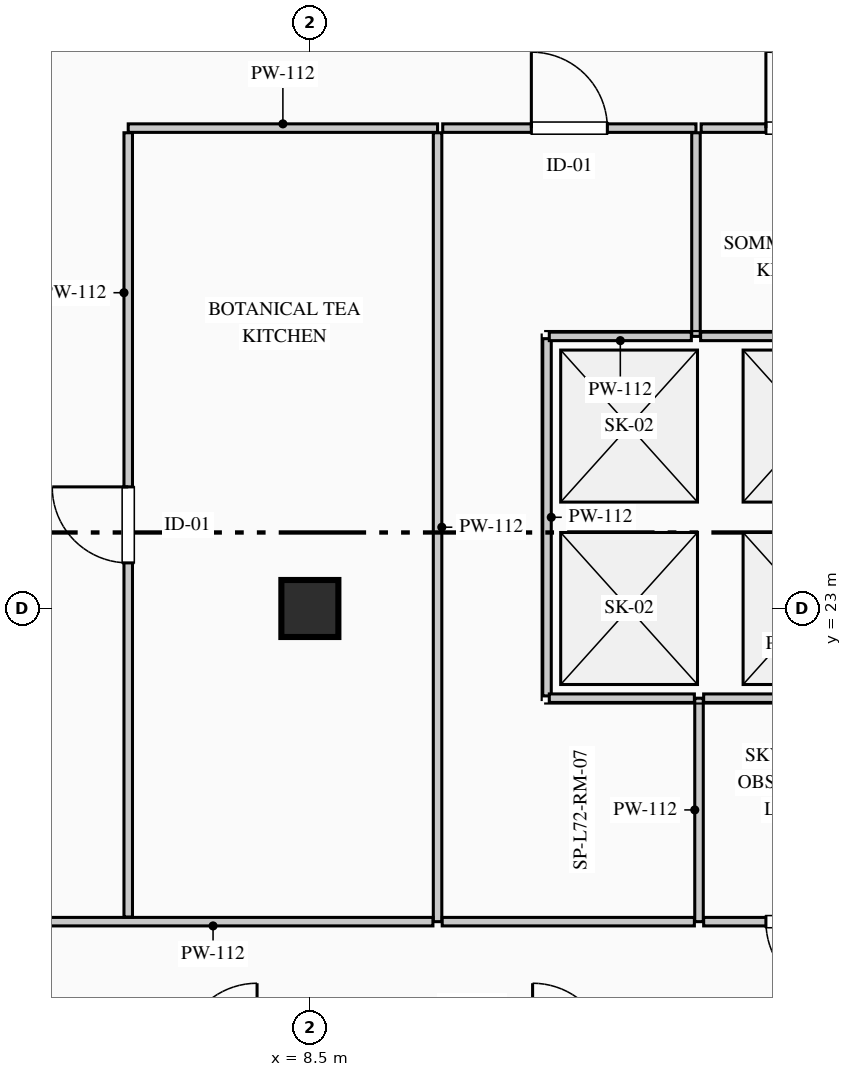
"""IFC4 building model, lengths in metres.
Left out: names, types, materials, properties, quantities, classifications, styles, units other than length and angle.
Written with IfcOpenShell. Run it as: python <this file> out.ifc"""

import sys

from ifc_helpers import new_model, si_unit, direction, frame, frame_2d, origin, origin_2d, place, context, subcontext, project, spatial, rectangle, extrude, element, fill, save


model = new_model("IFC4")
c1 = context("Model", 3, precision=1e-05, world=origin(), true_north=direction((0.0, 1.0)))
c2 = subcontext(c1, "Body", "Model", "MODEL_VIEW")
j1 = project(units=[si_unit("LENGTHUNIT", "METRE"), si_unit("PLANEANGLEUNIT", "RADIAN")], contexts=[c1])
p1 = place(None, origin())
s1 = spatial("IfcSite", under=j1, at=p1, CompositionType="ELEMENT")
p2 = place(p1, origin())
s2 = spatial("IfcBuilding", under=s1, at=p2, CompositionType="ELEMENT")
p3 = place(p2, frame((0.0, 0.0, 300.15)))
s3 = spatial("IfcBuildingStorey", under=s2, at=p3, CompositionType="ELEMENT", Elevation=300.15)
p4 = place(p3, frame((8.5, 23.0, 0.0), z_axis=(0.0, 0.0, 1.0), x_axis=(1.0, 0.0, 0.0)))
e1 = element("IfcColumn", 1, at=p4, inside=s3, PredefinedType="COLUMN", context=c2, shape_type="SweptSolid", body=[
    extrude(rectangle(XDim=0.75, YDim=0.75, at=origin_2d()), origin(), (0.0, 0.0, 1.0), 3.95),
])
p5 = place(p3, frame((13.62, 18.88, 0.0), z_axis=(0.0, 0.0, 1.0), x_axis=(0.0, 1.0, 0.0)))
e2 = element("IfcWall", 2, at=p5, inside=s3, PredefinedType="PARTITIONING", context=c2, shape_type="SweptSolid", body=[
    extrude(rectangle(XDim=2.94, YDim=0.112, at=frame_2d((1.47, 0.0))), origin(), (0.0, 0.0, 1.0), 3.7),
])
p6 = place(p3, frame((13.681, 21.82, 0.0), z_axis=(0.0, 0.0, 1.0), x_axis=(1.0, 0.0, 0.0)))
e3 = element("IfcWall", 3, at=p6, inside=s3, PredefinedType="PARTITIONING", context=c2, shape_type="SweptSolid", body=[
    extrude(rectangle(XDim=2.469, YDim=0.112, at=frame_2d((1.234, 0.0))), origin(), (0.0, 0.0, 1.0), 3.7),
])
p7 = place(p3, frame((16.319, 18.88, 0.0), z_axis=(0.0, 0.0, 1.0), x_axis=(-1.0, 0.0, 0.0)))
e4 = element("IfcWall", 4, at=p7, inside=s3, PredefinedType="PARTITIONING", context=c2, shape_type="SweptSolid", body=[
    extrude(rectangle(XDim=2.638, YDim=0.112, at=frame_2d((1.319, 0.0))), origin(), (0.0, 0.0, 1.0), 3.7),
])
p8 = place(p7, frame((0.819, 0.0, 0.0)))
e5 = element("IfcOpeningElement", 5, at=p8, cuts=e4, PredefinedType="OPENING", context=c2, shape_type="SweptSolid", body=[
    extrude(rectangle(XDim=1.0, YDim=2.15, at=frame_2d((0.5, 1.075))), frame((0.0, 0.066, 0.0), z_axis=(0.0, -1.0, 0.0), x_axis=(1.0, 0.0, 0.0)), (0.0, 0.0, 1.0), 0.132),
])
p9 = place(p3, frame((6.11, 29.32, 0.0), z_axis=(0.0, 0.0, 1.0), x_axis=(1.0, 0.0, 0.0)))
e6 = element("IfcWall", 6, at=p9, inside=s3, PredefinedType="PARTITIONING", context=c2, shape_type="SweptSolid", body=[
    extrude(rectangle(XDim=4.07, YDim=0.112, at=frame_2d((2.035, 0.0))), origin(), (0.0, 0.0, 1.0), 3.7),
])
p10 = place(p3, frame((10.18, 29.259, 0.0), z_axis=(0.0, 0.0, 1.0), x_axis=(0.0, -1.0, 0.0)))
e7 = element("IfcWall", 7, at=p10, inside=s3, PredefinedType="PARTITIONING", context=c2, shape_type="SweptSolid", body=[
    extrude(rectangle(XDim=10.379, YDim=0.112, at=frame_2d((5.189, 0.0))), origin(), (0.0, 0.0, 1.0), 3.325),
])
p11 = place(p3, frame((10.119, 18.88, 0.0), z_axis=(0.0, 0.0, 1.0), x_axis=(-1.0, 0.0, 0.0)))
e8 = element("IfcWall", 8, at=p11, inside=s3, PredefinedType="PARTITIONING", context=c2, shape_type="SweptSolid", body=[
    extrude(rectangle(XDim=5.786, YDim=0.112, at=frame_2d((2.893, 0.0))), origin(), (0.0, 0.0, 1.0), 3.7),
])
p12 = place(p3, frame((6.11, 18.941, 0.0), z_axis=(0.0, 0.0, 1.0), x_axis=(0.0, 1.0, 0.0)))
e9 = element("IfcWall", 9, at=p12, inside=s3, PredefinedType="PARTITIONING", context=c2, shape_type="SweptSolid", body=[
    extrude(rectangle(XDim=10.318, YDim=0.112, at=frame_2d((5.159, 0.0))), origin(), (0.0, 0.0, 1.0), 3.7),
])
p13 = place(p12, frame((4.659, 0.0, 0.0)))
e10 = element("IfcOpeningElement", 10, at=p13, cuts=e9, PredefinedType="OPENING", context=c2, shape_type="SweptSolid", body=[
    extrude(rectangle(XDim=1.0, YDim=2.15, at=frame_2d((0.5, 1.075))), frame((0.0, 0.066, 0.0), z_axis=(0.0, -1.0, 0.0), x_axis=(1.0, 0.0, 0.0)), (0.0, 0.0, 1.0), 0.132),
])
p14 = place(p3, frame((11.62, 26.55, 0.0), z_axis=(0.0, 0.0, 1.0), x_axis=(0.0, -1.0, 0.0)))
e11 = element("IfcWall", 11, at=p14, inside=s3, PredefinedType="PARTITIONING", context=c2, shape_type="SweptSolid", body=[
    extrude(rectangle(XDim=4.7, YDim=0.112, at=frame_2d((2.35, 0.0))), origin(), (0.0, 0.0, 1.0), 3.325),
])
p15 = place(p3, frame((11.65, 21.82, 0.0), z_axis=(0.0, 0.0, 1.0), x_axis=(1.0, 0.0, 0.0)))
e12 = element("IfcWall", 12, at=p15, inside=s3, PredefinedType="PARTITIONING", context=c2, shape_type="SweptSolid", body=[
    extrude(rectangle(XDim=1.909, YDim=0.112, at=frame_2d((0.955, 0.0))), origin(), (0.0, 0.0, 1.0), 3.7),
])
p16 = place(p3, frame((13.559, 18.88, 0.0), z_axis=(0.0, 0.0, 1.0), x_axis=(-1.0, 0.0, 0.0)))
e13 = element("IfcWall", 13, at=p16, inside=s3, PredefinedType="PARTITIONING", context=c2, shape_type="SweptSolid", body=[
    extrude(rectangle(XDim=3.318, YDim=0.112, at=frame_2d((1.659, 0.0))), origin(), (0.0, 0.0, 1.0), 3.7),
])
p17 = place(p3, frame((10.248, 29.32, 0.0), z_axis=(0.0, 0.0, 1.0), x_axis=(1.0, 0.0, 0.0)))
e14 = element("IfcWall", 14, at=p17, inside=s3, PredefinedType="PARTITIONING", context=c2, shape_type="SweptSolid", body=[
    extrude(rectangle(XDim=3.332, YDim=0.112, at=frame_2d((1.666, 0.0))), origin(), (0.0, 0.0, 1.0), 3.7),
])
p18 = place(p17, frame((1.166, 0.0, 0.0)))
e15 = element("IfcOpeningElement", 15, at=p18, cuts=e14, PredefinedType="OPENING", context=c2, shape_type="SweptSolid", body=[
    extrude(rectangle(XDim=1.0, YDim=2.15, at=frame_2d((0.5, 1.075))), frame((0.0, 0.066, 0.0), z_axis=(0.0, -1.0, 0.0), x_axis=(1.0, 0.0, 0.0)), (0.0, 0.0, 1.0), 0.132),
])
p19 = place(p3, frame((13.58, 29.259, 0.0), z_axis=(0.0, 0.0, 1.0), x_axis=(0.0, -1.0, 0.0)))
e16 = element("IfcWall", 16, at=p19, inside=s3, PredefinedType="PARTITIONING", context=c2, shape_type="SweptSolid", body=[
    extrude(rectangle(XDim=2.679, YDim=0.112, at=frame_2d((1.339, 0.0))), origin(), (0.0, 0.0, 1.0), 3.7),
])
p20 = place(p3, frame((13.519, 26.58, 0.0), z_axis=(0.0, 0.0, 1.0), x_axis=(-1.0, 0.0, 0.0)))
e17 = element("IfcWall", 17, at=p20, inside=s3, PredefinedType="PARTITIONING", context=c2, shape_type="SweptSolid", body=[
    extrude(rectangle(XDim=1.869, YDim=0.112, at=frame_2d((0.935, 0.0))), origin(), (0.0, 0.0, 1.0), 3.7),
])
p21 = place(p3, frame((16.15, 26.58, 0.0), z_axis=(0.0, 0.0, 1.0), x_axis=(-1.0, 0.0, 0.0)))
e18 = element("IfcWall", 18, at=p21, inside=s3, PredefinedType="PARTITIONING", context=c2, shape_type="SweptSolid", body=[
    extrude(rectangle(XDim=2.509, YDim=0.112, at=frame_2d((1.254, 0.0))), origin(), (0.0, 0.0, 1.0), 3.7),
])
p22 = place(p3, frame((13.648, 29.32, 0.0), z_axis=(0.0, 0.0, 1.0), x_axis=(1.0, 0.0, 0.0)))
e19 = element("IfcWall", 19, at=p22, inside=s3, PredefinedType="PARTITIONING", context=c2, shape_type="SweptSolid", body=[
    extrude(rectangle(XDim=2.704, YDim=0.112, at=frame_2d((1.352, 0.0))), origin(), (0.0, 0.0, 1.0), 3.7),
])
p23 = place(p22, frame((0.852, 0.0, 0.0)))
e20 = element("IfcOpeningElement", 20, at=p23, cuts=e19, PredefinedType="OPENING", context=c2, shape_type="SweptSolid", body=[
    extrude(rectangle(XDim=1.0, YDim=2.15, at=frame_2d((0.5, 1.075))), frame((0.0, 0.066, 0.0), z_axis=(0.0, -1.0, 0.0), x_axis=(1.0, 0.0, 0.0)), (0.0, 0.0, 1.0), 0.132),
])
p24 = place(p3, frame((0.0, 0.0, -0.25)))
p25 = place(p24, frame((12.7, 23.0, 0.2)))
e21 = element("IfcWindow", 21, at=p25, inside=s3, PartitioningType="SINGLE_PANEL", PredefinedType="SKYLIGHT", context=c2, shape_type="SweptSolid", body=[
    extrude(rectangle(XDim=1.8, YDim=2.0, at=origin_2d()), origin(), (0.0, 0.0, 1.0), 0.05),
])
p26 = place(p24, frame((15.1, 23.0, 0.2)))
e22 = element("IfcWindow", 22, at=p26, inside=s3, PartitioningType="SINGLE_PANEL", PredefinedType="SKYLIGHT", context=c2, shape_type="SweptSolid", body=[
    extrude(rectangle(XDim=1.8, YDim=2.0, at=origin_2d()), origin(), (0.0, 0.0, 1.0), 0.05),
])
p27 = place(p24, frame((12.7, 25.4, 0.2)))
e23 = element("IfcWindow", 23, at=p27, inside=s3, PartitioningType="SINGLE_PANEL", PredefinedType="SKYLIGHT", context=c2, shape_type="SweptSolid", body=[
    extrude(rectangle(XDim=1.8, YDim=2.0, at=origin_2d()), origin(), (0.0, 0.0, 1.0), 0.05),
])
p28 = place(p24, frame((15.1, 25.4, 0.2)))
e24 = element("IfcWindow", 24, at=p28, inside=s3, PartitioningType="SINGLE_PANEL", PredefinedType="SKYLIGHT", context=c2, shape_type="SweptSolid", body=[
    extrude(rectangle(XDim=1.8, YDim=2.0, at=origin_2d()), origin(), (0.0, 0.0, 1.0), 0.05),
])
p29 = place(p8, origin())
e25 = element("IfcDoor", 25, at=p29, inside=s3, OperationType="SINGLE_SWING_LEFT", PredefinedType="DOOR", context=c2, shape_type="SweptSolid", body=[
    extrude(rectangle(XDim=1.0, YDim=2.15, at=frame_2d((0.5, 1.075))), frame((0.0, 0.025, 0.0), z_axis=(0.0, -1.0, 0.0), x_axis=(1.0, 0.0, 0.0)), (0.0, 0.0, 1.0), 0.05),
])
fill(e5, e25)
p30 = place(p13, origin())
e26 = element("IfcDoor", 26, at=p30, inside=s3, OperationType="SINGLE_SWING_RIGHT", PredefinedType="DOOR", context=c2, shape_type="SweptSolid", body=[
    extrude(rectangle(XDim=1.0, YDim=2.15, at=frame_2d((0.5, 1.075))), frame((0.0, 0.025, 0.0), z_axis=(0.0, -1.0, 0.0), x_axis=(1.0, 0.0, 0.0)), (0.0, 0.0, 1.0), 0.05),
])
fill(e10, e26)
p31 = place(p18, origin())
e27 = element("IfcDoor", 27, at=p31, inside=s3, OperationType="SINGLE_SWING_LEFT", PredefinedType="DOOR", context=c2, shape_type="SweptSolid", body=[
    extrude(rectangle(XDim=1.0, YDim=2.15, at=frame_2d((0.5, 1.075))), frame((0.0, 0.025, 0.0), z_axis=(0.0, -1.0, 0.0), x_axis=(1.0, 0.0, 0.0)), (0.0, 0.0, 1.0), 0.05),
])
fill(e15, e27)
p32 = place(p23, origin())
e28 = element("IfcDoor", 28, at=p32, inside=s3, OperationType="SINGLE_SWING_LEFT", PredefinedType="DOOR", context=c2, shape_type="SweptSolid", body=[
    extrude(rectangle(XDim=1.0, YDim=2.15, at=frame_2d((0.5, 1.075))), frame((0.0, 0.025, 0.0), z_axis=(0.0, -1.0, 0.0), x_axis=(1.0, 0.0, 0.0)), (0.0, 0.0, 1.0), 0.05),
])
fill(e20, e28)
save(model, sys.argv[1])
